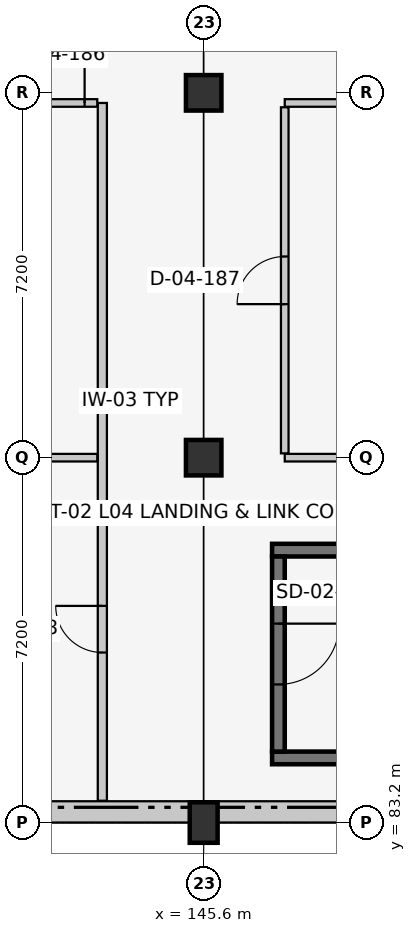
"""IFC4 building model, lengths in metres.
Left out: names, types, materials, properties, quantities, classifications, styles, units other than length and angle.
Written with IfcOpenShell. Run it as: python <this file> out.ifc"""

import sys

from ifc_helpers import new_model, si_unit, direction, frame, frame_2d, origin, origin_2d, place, context, subcontext, project, spatial, rectangle, extrude, element, fill, save


model = new_model("IFC4")
c1 = context("Model", 3, precision=1e-05, world=origin(), true_north=direction((0.0, 1.0)))
c2 = subcontext(c1, "Body", "Model", "MODEL_VIEW")
j1 = project(units=[si_unit("LENGTHUNIT", "METRE"), si_unit("PLANEANGLEUNIT", "RADIAN")], contexts=[c1])
p1 = place(None, origin())
s1 = spatial("IfcSite", under=j1, at=p1, CompositionType="ELEMENT")
p2 = place(p1, origin())
s2 = spatial("IfcBuilding", under=s1, at=p2, CompositionType="ELEMENT")
p3 = place(p2, frame((0.0, 0.0, 18.0)))
s3 = spatial("IfcBuildingStorey", under=s2, at=p3, CompositionType="ELEMENT", Elevation=18.0)
p4 = place(p3, frame((145.6, 83.2, 0.0), z_axis=(0.0, 0.0, 1.0), x_axis=(1.0, 0.0, 0.0)))
e1 = element("IfcColumn", 1, at=p4, inside=s3, PredefinedType="COLUMN", context=c2, shape_type="SweptSolid", body=[
    extrude(rectangle(XDim=0.55, YDim=0.8, at=origin_2d()), origin(), (0.0, 0.0, 1.0), 3.9),
])
for number, where, z_axis, x_axis in (
    (2, (145.6, 90.4, 0.0), (0.0, 0.0, 1.0), (1.0, 0.0, 0.0)),
    (3, (145.6, 97.6, 0.0), (0.0, 0.0, 1.0), (1.0, 0.0, 0.0)),
):
    element("IfcColumn", number, at=place(p3, frame(where, z_axis=z_axis, x_axis=x_axis)), inside=s3, PredefinedType="COLUMN", context=c2, shape_type="SweptSolid", body=[
        extrude(rectangle(XDim=0.7, YDim=0.7, at=origin_2d()), origin(), (0.0, 0.0, 1.0), 3.9),
    ])
p5 = place(p3, frame((160.0, 83.41, 0.0), z_axis=(0.0, 0.0, 1.0), x_axis=(-1.0, 0.0, 0.0)))
e4 = element("IfcWall", 4, at=p5, inside=s3, PredefinedType="SOLIDWALL", context=c2, shape_type="SweptSolid", body=[
    extrude(rectangle(XDim=28.8, YDim=0.42, at=frame_2d((14.4, 0.0))), origin(), (0.0, 0.0, 1.0), 2.955),
])
for number, where, z_axis, x_axis in (
    (5, (146.95, 84.475, 0.0), (0.0, 0.0, 1.0), (1.0, 0.0, 0.0)),
    (6, (155.85, 88.575, 0.0), (0.0, 0.0, 1.0), (-1.0, 0.0, 0.0)),
):
    element("IfcWall", number, at=place(p3, frame(where, z_axis=z_axis, x_axis=x_axis)), inside=s3, PredefinedType="SHEAR", context=c2, shape_type="SweptSolid", body=[
        extrude(rectangle(XDim=8.9, YDim=0.25, at=frame_2d((4.45, 0.0))), origin(), (0.0, 0.0, 1.0), 3.66),
    ])
p6 = place(p3, frame((147.075, 88.45, 0.0), z_axis=(0.0, 0.0, 1.0), x_axis=(0.0, -1.0, 0.0)))
e7 = element("IfcWall", 7, at=p6, inside=s3, PredefinedType="SHEAR", context=c2, shape_type="SweptSolid", body=[
    extrude(rectangle(XDim=3.85, YDim=0.25, at=frame_2d((1.925, 0.0))), origin(), (0.0, 0.0, 1.0), 3.66),
])
p7 = place(p6, frame((1.325, 0.0, 0.0)))
e8 = element("IfcOpeningElement", 8, at=p7, cuts=e7, PredefinedType="OPENING", context=c2, shape_type="SweptSolid", body=[
    extrude(rectangle(XDim=1.2, YDim=2.15, at=frame_2d((0.6, 1.075))), frame((0.0, 0.137, 0.0), z_axis=(0.0, -1.0, 0.0), x_axis=(1.0, 0.0, 0.0)), (0.0, 0.0, 1.0), 0.274),
])
p8 = place(p3, frame((143.6, 83.63, 0.0), z_axis=(0.0, 0.0, 1.0), x_axis=(0.0, 1.0, 0.0)))
e9 = element("IfcWall", 9, at=p8, inside=s3, PredefinedType="PARTITIONING", context=c2, shape_type="SweptSolid", body=[
    extrude(rectangle(XDim=13.77, YDim=0.18, at=frame_2d((6.885, 0.0))), origin(), (0.0, 0.0, 1.0), 3.66),
])
p9 = place(p8, frame((2.925, 0.0, 0.0)))
e10 = element("IfcOpeningElement", 10, at=p9, cuts=e9, PredefinedType="OPENING", context=c2, shape_type="SweptSolid", body=[
    extrude(rectangle(XDim=0.92, YDim=2.08, at=frame_2d((0.46, 1.04))), frame((0.0, 0.102, 0.0), z_axis=(0.0, -1.0, 0.0), x_axis=(1.0, 0.0, 0.0)), (0.0, 0.0, 1.0), 0.204),
])
p10 = place(p3, frame((131.63, 90.4, 0.0), z_axis=(0.0, 0.0, 1.0), x_axis=(1.0, 0.0, 0.0)))
e11 = element("IfcWall", 11, at=p10, inside=s3, PredefinedType="PARTITIONING", context=c2, shape_type="SweptSolid", body=[
    extrude(rectangle(XDim=11.87, YDim=0.15, at=frame_2d((5.935, 0.0))), origin(), (0.0, 0.0, 1.0), 2.835),
])
p11 = place(p3, frame((131.63, 97.4, 0.0), z_axis=(0.0, 0.0, 1.0), x_axis=(1.0, 0.0, 0.0)))
e12 = element("IfcWall", 12, at=p11, inside=s3, PredefinedType="PARTITIONING", context=c2, shape_type="SweptSolid", body=[
    extrude(rectangle(XDim=11.87, YDim=0.15, at=frame_2d((5.935, 0.0))), origin(), (0.0, 0.0, 1.0), 2.835),
])
p12 = place(p11, frame((10.66, 0.0, 0.0)))
e13 = element("IfcOpeningElement", 13, at=p12, cuts=e12, PredefinedType="OPENING", context=c2, shape_type="SweptSolid", body=[
    extrude(rectangle(XDim=0.96, YDim=2.1, at=frame_2d((0.48, 1.05))), frame((0.0, 0.087, 0.0), z_axis=(0.0, -1.0, 0.0), x_axis=(1.0, 0.0, 0.0)), (0.0, 0.0, 1.0), 0.174),
])
for number, where, z_axis, x_axis in (
    (14, (147.2, 90.4, 0.0), (0.0, 0.0, 1.0), (1.0, 0.0, 0.0)),
    (15, (147.2, 97.4, 0.0), (0.0, 0.0, 1.0), (1.0, 0.0, 0.0)),
):
    element("IfcWall", number, at=place(p3, frame(where, z_axis=z_axis, x_axis=x_axis)), inside=s3, PredefinedType="PARTITIONING", context=c2, shape_type="SweptSolid", body=[
        extrude(rectangle(XDim=6.2, YDim=0.15, at=frame_2d((3.1, 0.0))), origin(), (0.0, 0.0, 1.0), 2.985),
    ])
p13 = place(p3, frame((147.2, 90.485, 0.0), z_axis=(0.0, 0.0, 1.0), x_axis=(0.0, 1.0, 0.0)))
e16 = element("IfcWall", 16, at=p13, inside=s3, PredefinedType="PARTITIONING", context=c2, shape_type="SweptSolid", body=[
    extrude(rectangle(XDim=6.83, YDim=0.15, at=frame_2d((3.415, 0.0))), origin(), (0.0, 0.0, 1.0), 3.66),
])
p14 = place(p13, frame((2.945, 0.0, 0.0)))
e17 = element("IfcOpeningElement", 17, at=p14, cuts=e16, PredefinedType="OPENING", context=c2, shape_type="SweptSolid", body=[
    extrude(rectangle(XDim=0.94, YDim=2.1, at=frame_2d((0.47, 1.05))), frame((0.0, 0.087, 0.0), z_axis=(0.0, -1.0, 0.0), x_axis=(1.0, 0.0, 0.0)), (0.0, 0.0, 1.0), 0.174),
])
p15 = place(p7, origin())
e18 = element("IfcDoor", 18, at=p15, inside=s3, OperationType="SINGLE_SWING_LEFT", PredefinedType="DOOR", context=c2, shape_type="SweptSolid", body=[
    extrude(rectangle(XDim=1.2, YDim=2.15, at=frame_2d((0.6, 1.075))), frame((0.0, 0.025, 0.0), z_axis=(0.0, -1.0, 0.0), x_axis=(1.0, 0.0, 0.0)), (0.0, 0.0, 1.0), 0.05),
])
fill(e8, e18)
p16 = place(p12, origin())
e19 = element("IfcDoor", 19, at=p16, inside=s3, OperationType="SINGLE_SWING_RIGHT", PredefinedType="DOOR", context=c2, shape_type="SweptSolid", body=[
    extrude(rectangle(XDim=0.96, YDim=2.1, at=frame_2d((0.48, 1.05))), frame((0.0, 0.025, 0.0), z_axis=(0.0, -1.0, 0.0), x_axis=(1.0, 0.0, 0.0)), (0.0, 0.0, 1.0), 0.05),
])
fill(e13, e19)
p17 = place(p14, origin())
e20 = element("IfcDoor", 20, at=p17, inside=s3, OperationType="SINGLE_SWING_LEFT", PredefinedType="DOOR", context=c2, shape_type="SweptSolid", body=[
    extrude(rectangle(XDim=0.94, YDim=2.1, at=frame_2d((0.47, 1.05))), frame((0.0, 0.025, 0.0), z_axis=(0.0, -1.0, 0.0), x_axis=(1.0, 0.0, 0.0)), (0.0, 0.0, 1.0), 0.05),
])
fill(e17, e20)
p18 = place(p9, origin())
e21 = element("IfcDoor", 21, at=p18, inside=s3, OperationType="SINGLE_SWING_RIGHT", PredefinedType="DOOR", context=c2, shape_type="SweptSolid", body=[
    extrude(rectangle(XDim=0.92, YDim=2.08, at=frame_2d((0.46, 1.04))), frame((0.0, 0.025, 0.0), z_axis=(0.0, -1.0, 0.0), x_axis=(1.0, 0.0, 0.0)), (0.0, 0.0, 1.0), 0.05),
])
fill(e10, e21)
save(model, sys.argv[1])
